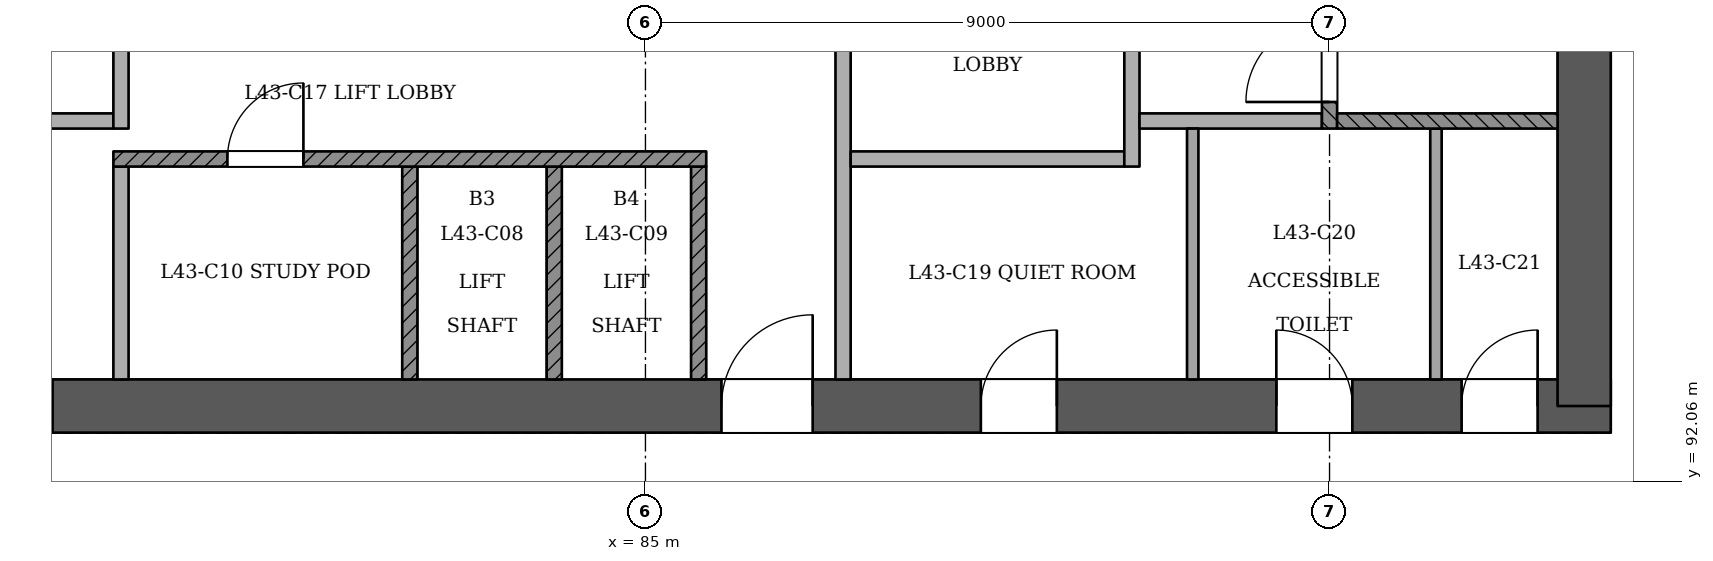
"""IFC4 building model, lengths in metres.
Left out: names, types, materials, properties, quantities, classifications, styles, units other than length and angle.
Written with IfcOpenShell. Run it as: python <this file> out.ifc"""

import sys

from ifc_helpers import new_model, si_unit, direction, frame, frame_2d, origin, place, context, subcontext, project, spatial, rectangle, extrude, element, fill, save


model = new_model("IFC4")
c1 = context("Model", 3, precision=1e-05, world=origin(), true_north=direction((0.0, 1.0)))
c2 = subcontext(c1, "Body", "Model", "MODEL_VIEW")
j1 = project(units=[si_unit("LENGTHUNIT", "METRE"), si_unit("PLANEANGLEUNIT", "RADIAN")], contexts=[c1])
p1 = place(None, origin())
s1 = spatial("IfcSite", under=j1, at=p1, CompositionType="ELEMENT")
p2 = place(p1, origin())
s2 = spatial("IfcBuilding", under=s1, at=p2, CompositionType="ELEMENT")
p3 = place(p2, frame((0.0, 0.0, 167.4)))
s3 = spatial("IfcBuildingStorey", under=s2, at=p3, CompositionType="ELEMENT", Elevation=167.4)
p4 = place(p3, frame((72.65, 93.05, 0.0), z_axis=(0.0, 0.0, 1.0), x_axis=(1.0, 0.0, 0.0)))
e1 = element("IfcWall", 1, at=p4, inside=s3, PredefinedType="SHEAR", context=c2, shape_type="SweptSolid", body=[
    extrude(rectangle(XDim=25.05, YDim=0.7, at=frame_2d((12.525, 0.0))), origin(), (0.0, 0.0, 1.0), 3.6),
])
p5 = place(p4, frame((1.15, 0.0, 0.0)))
e2 = element("IfcOpeningElement", 2, at=p5, cuts=e1, PredefinedType="OPENING", context=c2, shape_type="SweptSolid", body=[
    extrude(rectangle(XDim=1.2, YDim=2.1, at=frame_2d((0.6, 1.05))), frame((0.0, 0.36, 0.0), z_axis=(0.0, -1.0, 0.0), x_axis=(1.0, 0.0, 0.0)), (0.0, 0.0, 1.0), 0.721),
])
p6 = place(p4, frame((3.35, 0.0, 0.0)))
e3 = element("IfcOpeningElement", 3, at=p6, cuts=e1, PredefinedType="OPENING", context=c2, shape_type="SweptSolid", body=[
    extrude(rectangle(XDim=1.2, YDim=2.1, at=frame_2d((0.6, 1.05))), frame((0.0, 0.36, 0.0), z_axis=(0.0, -1.0, 0.0), x_axis=(1.0, 0.0, 0.0)), (0.0, 0.0, 1.0), 0.721),
])
p7 = place(p4, frame((13.35, 0.0, 0.0)))
e4 = element("IfcOpeningElement", 4, at=p7, cuts=e1, PredefinedType="OPENING", context=c2, shape_type="SweptSolid", body=[
    extrude(rectangle(XDim=1.2, YDim=2.1, at=frame_2d((0.6, 1.05))), frame((0.0, 0.36, 0.0), z_axis=(0.0, -1.0, 0.0), x_axis=(1.0, 0.0, 0.0)), (0.0, 0.0, 1.0), 0.721),
])
p8 = place(p4, frame((16.762, 0.0, 0.0)))
e5 = element("IfcOpeningElement", 5, at=p8, cuts=e1, PredefinedType="OPENING", context=c2, shape_type="SweptSolid", body=[
    extrude(rectangle(XDim=1.0, YDim=2.1, at=frame_2d((0.5, 1.05))), frame((0.0, 0.36, 0.0), z_axis=(0.0, -1.0, 0.0), x_axis=(1.0, 0.0, 0.0)), (0.0, 0.0, 1.0), 0.721),
])
p9 = place(p4, frame((20.65, 0.0, 0.0)))
e6 = element("IfcOpeningElement", 6, at=p9, cuts=e1, PredefinedType="OPENING", context=c2, shape_type="SweptSolid", body=[
    extrude(rectangle(XDim=1.0, YDim=2.1, at=frame_2d((0.5, 1.05))), frame((0.0, 0.36, 0.0), z_axis=(0.0, -1.0, 0.0), x_axis=(1.0, 0.0, 0.0)), (0.0, 0.0, 1.0), 0.721),
])
p10 = place(p4, frame((23.087, 0.0, 0.0)))
e7 = element("IfcOpeningElement", 7, at=p10, cuts=e1, PredefinedType="OPENING", context=c2, shape_type="SweptSolid", body=[
    extrude(rectangle(XDim=1.0, YDim=2.1, at=frame_2d((0.5, 1.05))), frame((0.0, 0.36, 0.0), z_axis=(0.0, -1.0, 0.0), x_axis=(1.0, 0.0, 0.0)), (0.0, 0.0, 1.0), 0.721),
])
p11 = place(p3, frame((97.35, 93.05, 0.0), z_axis=(0.0, 0.0, 1.0), x_axis=(0.0, 1.0, 0.0)))
e8 = element("IfcWall", 8, at=p11, inside=s3, PredefinedType="SHEAR", context=c2, shape_type="SweptSolid", body=[
    extrude(rectangle(XDim=11.05, YDim=0.7, at=frame_2d((5.525, 0.0))), origin(), (0.0, 0.0, 1.0), 3.6),
])
p12 = place(p3, frame((78.1, 93.4, 0.0), z_axis=(0.0, 0.0, 1.0), x_axis=(0.0, 1.0, 0.0)))
e9 = element("IfcWall", 9, at=p12, inside=s3, PredefinedType="PARTITIONING", context=c2, shape_type="SweptSolid", body=[
    extrude(rectangle(XDim=2.8, YDim=0.2, at=frame_2d((1.4, 0.0))), origin(), (0.0, 0.0, 1.0), 3.15),
])
for number, where, z_axis, x_axis in (
    (10, (81.9, 93.4, 0.0), (0.0, 0.0, 1.0), (0.0, 1.0, 0.0)),
    (11, (83.8, 93.4, 0.0), (0.0, 0.0, 1.0), (0.0, 1.0, 0.0)),
    (12, (85.7, 93.4, 0.0), (0.0, 0.0, 1.0), (0.0, 1.0, 0.0)),
):
    element("IfcWall", number, at=place(p3, frame(where, z_axis=z_axis, x_axis=x_axis)), inside=s3, PredefinedType="SOLIDWALL", context=c2, shape_type="SweptSolid", body=[
        extrude(rectangle(XDim=2.8, YDim=0.2, at=frame_2d((1.4, 0.0))), origin(), (0.0, 0.0, 1.0), 3.15),
    ])
p13 = place(p3, frame((87.6, 93.4, 0.0), z_axis=(0.0, 0.0, 1.0), x_axis=(0.0, 1.0, 0.0)))
e13 = element("IfcWall", 13, at=p13, inside=s3, PredefinedType="PARTITIONING", context=c2, shape_type="SweptSolid", body=[
    extrude(rectangle(XDim=7.0, YDim=0.2, at=frame_2d((3.5, 0.0))), origin(), (0.0, 0.0, 1.0), 3.15),
])
p14 = place(p13, frame((4.45, 0.0, 0.0)))
e14 = element("IfcOpeningElement", 14, at=p14, cuts=e13, PredefinedType="OPENING", context=c2, shape_type="SweptSolid", body=[
    extrude(rectangle(XDim=1.1, YDim=2.1, at=frame_2d((0.55, 1.05))), frame((0.0, 0.11, 0.0), z_axis=(0.0, -1.0, 0.0), x_axis=(1.0, 0.0, 0.0)), (0.0, 0.0, 1.0), 0.221),
])
for number, where, z_axis, x_axis in (
    (15, (92.2, 93.4, 0.0), (0.0, 0.0, 1.0), (0.0, 1.0, 0.0)),
    (16, (95.4, 93.4, 0.0), (0.0, 0.0, 1.0), (0.0, 1.0, 0.0)),
):
    element("IfcWall", number, at=place(p3, frame(where, z_axis=z_axis, x_axis=x_axis)), inside=s3, PredefinedType="PARTITIONING", context=c2, shape_type="SweptSolid", body=[
        extrude(rectangle(XDim=3.3, YDim=0.15, at=frame_2d((1.65, 0.0))), origin(), (0.0, 0.0, 1.0), 3.15),
    ])
p15 = place(p3, frame((78.0, 96.3, 0.0), z_axis=(0.0, 0.0, 1.0), x_axis=(1.0, 0.0, 0.0)))
e17 = element("IfcWall", 17, at=p15, inside=s3, PredefinedType="SOLIDWALL", context=c2, shape_type="SweptSolid", body=[
    extrude(rectangle(XDim=7.8, YDim=0.2, at=frame_2d((3.9, 0.0))), origin(), (0.0, 0.0, 1.0), 3.15),
])
p16 = place(p15, frame((1.5, 0.0, 0.0)))
e18 = element("IfcOpeningElement", 18, at=p16, cuts=e17, PredefinedType="OPENING", context=c2, shape_type="SweptSolid", body=[
    extrude(rectangle(XDim=1.0, YDim=2.1, at=frame_2d((0.5, 1.05))), frame((0.0, 0.11, 0.0), z_axis=(0.0, -1.0, 0.0), x_axis=(1.0, 0.0, 0.0)), (0.0, 0.0, 1.0), 0.221),
])
p17 = place(p3, frame((87.7, 96.3, 0.0), z_axis=(0.0, 0.0, 1.0), x_axis=(1.0, 0.0, 0.0)))
e19 = element("IfcWall", 19, at=p17, inside=s3, PredefinedType="PARTITIONING", context=c2, shape_type="SweptSolid", body=[
    extrude(rectangle(XDim=3.6, YDim=0.2, at=frame_2d((1.8, 0.0))), origin(), (0.0, 0.0, 1.0), 3.15),
])
p18 = place(p3, frame((91.4, 96.2, 0.0), z_axis=(0.0, 0.0, 1.0), x_axis=(0.0, 1.0, 0.0)))
e20 = element("IfcWall", 20, at=p18, inside=s3, PredefinedType="PARTITIONING", context=c2, shape_type="SweptSolid", body=[
    extrude(rectangle(XDim=4.2, YDim=0.2, at=frame_2d((2.1, 0.0))), origin(), (0.0, 0.0, 1.0), 3.15),
])
p19 = place(p18, frame((2.45, 0.0, 0.0)))
e21 = element("IfcOpeningElement", 21, at=p19, cuts=e20, PredefinedType="OPENING", context=c2, shape_type="SweptSolid", body=[
    extrude(rectangle(XDim=1.1, YDim=2.1, at=frame_2d((0.55, 1.05))), frame((0.0, 0.11, 0.0), z_axis=(0.0, -1.0, 0.0), x_axis=(1.0, 0.0, 0.0)), (0.0, 0.0, 1.0), 0.221),
])
p20 = place(p3, frame((76.1, 96.8, 0.0), z_axis=(0.0, 0.0, 1.0), x_axis=(1.0, 0.0, 0.0)))
e22 = element("IfcWall", 22, at=p20, inside=s3, PredefinedType="PARTITIONING", context=c2, shape_type="SweptSolid", body=[
    extrude(rectangle(XDim=1.9, YDim=0.2, at=frame_2d((0.95, 0.0))), origin(), (0.0, 0.0, 1.0), 3.15),
])
p21 = place(p3, frame((78.1, 96.7, 0.0), z_axis=(0.0, 0.0, 1.0), x_axis=(0.0, 1.0, 0.0)))
e23 = element("IfcWall", 23, at=p21, inside=s3, PredefinedType="PARTITIONING", context=c2, shape_type="SweptSolid", body=[
    extrude(rectangle(XDim=3.7, YDim=0.2, at=frame_2d((1.85, 0.0))), origin(), (0.0, 0.0, 1.0), 3.15),
])
p22 = place(p21, frame((1.95, 0.0, 0.0)))
e24 = element("IfcOpeningElement", 24, at=p22, cuts=e23, PredefinedType="OPENING", context=c2, shape_type="SweptSolid", body=[
    extrude(rectangle(XDim=1.1, YDim=2.1, at=frame_2d((0.55, 1.05))), frame((0.0, 0.11, 0.0), z_axis=(0.0, -1.0, 0.0), x_axis=(1.0, 0.0, 0.0)), (0.0, 0.0, 1.0), 0.221),
])
p23 = place(p3, frame((91.5, 96.8, 0.0), z_axis=(0.0, 0.0, 1.0), x_axis=(1.0, 0.0, 0.0)))
e25 = element("IfcWall", 25, at=p23, inside=s3, PredefinedType="PARTITIONING", context=c2, shape_type="SweptSolid", body=[
    extrude(rectangle(XDim=2.4, YDim=0.2, at=frame_2d((1.2, 0.0))), origin(), (0.0, 0.0, 1.0), 3.15),
])
p24 = place(p3, frame((94.0, 96.7, 0.0), z_axis=(0.0, 0.0, 1.0), x_axis=(0.0, 1.0, 0.0)))
e26 = element("IfcWall", 26, at=p24, inside=s3, PredefinedType="SOLIDWALL", context=c2, shape_type="SweptSolid", body=[
    extrude(rectangle(XDim=3.7, YDim=0.2, at=frame_2d((1.85, 0.0))), origin(), (0.0, 0.0, 1.0), 3.15),
])
p25 = place(p24, frame((0.35, 0.0, 0.0)))
e27 = element("IfcOpeningElement", 27, at=p25, cuts=e26, PredefinedType="OPENING", context=c2, shape_type="SweptSolid", body=[
    extrude(rectangle(XDim=1.1, YDim=2.1, at=frame_2d((0.55, 1.05))), frame((0.0, 0.11, 0.0), z_axis=(0.0, -1.0, 0.0), x_axis=(1.0, 0.0, 0.0)), (0.0, 0.0, 1.0), 0.221),
])
p26 = place(p3, frame((94.1, 96.8, 0.0), z_axis=(0.0, 0.0, 1.0), x_axis=(1.0, 0.0, 0.0)))
e28 = element("IfcWall", 28, at=p26, inside=s3, PredefinedType="SOLIDWALL", context=c2, shape_type="SweptSolid", body=[
    extrude(rectangle(XDim=2.9, YDim=0.2, at=frame_2d((1.45, 0.0))), origin(), (0.0, 0.0, 1.0), 3.15),
])
p27 = place(p25, origin())
e29 = element("IfcDoor", 29, at=p27, inside=s3, OperationType="SINGLE_SWING_LEFT", PredefinedType="NOTDEFINED", context=c2, shape_type="SweptSolid", body=[
    extrude(rectangle(XDim=1.1, YDim=2.1, at=frame_2d((0.55, 1.05))), frame((0.0, 0.025, 0.0), z_axis=(0.0, -1.0, 0.0), x_axis=(1.0, 0.0, 0.0)), (0.0, 0.0, 1.0), 0.05),
])
fill(e27, e29)
p28 = place(p6, origin())
e30 = element("IfcDoor", 30, at=p28, inside=s3, OperationType="SINGLE_SWING_LEFT", PredefinedType="NOTDEFINED", context=c2, shape_type="SweptSolid", body=[
    extrude(rectangle(XDim=1.2, YDim=2.1, at=frame_2d((0.6, 1.05))), frame((0.0, 0.025, 0.0), z_axis=(0.0, -1.0, 0.0), x_axis=(1.0, 0.0, 0.0)), (0.0, 0.0, 1.0), 0.05),
])
fill(e3, e30)
p29 = place(p7, origin())
e31 = element("IfcDoor", 31, at=p29, inside=s3, OperationType="SINGLE_SWING_RIGHT", PredefinedType="NOTDEFINED", context=c2, shape_type="SweptSolid", body=[
    extrude(rectangle(XDim=1.2, YDim=2.1, at=frame_2d((0.6, 1.05))), frame((0.0, 0.025, 0.0), z_axis=(0.0, -1.0, 0.0), x_axis=(1.0, 0.0, 0.0)), (0.0, 0.0, 1.0), 0.05),
])
fill(e4, e31)
p30 = place(p8, origin())
e32 = element("IfcDoor", 32, at=p30, inside=s3, OperationType="SINGLE_SWING_RIGHT", PredefinedType="NOTDEFINED", context=c2, shape_type="SweptSolid", body=[
    extrude(rectangle(XDim=1.0, YDim=2.1, at=frame_2d((0.5, 1.05))), frame((0.0, 0.025, 0.0), z_axis=(0.0, -1.0, 0.0), x_axis=(1.0, 0.0, 0.0)), (0.0, 0.0, 1.0), 0.05),
])
fill(e5, e32)
p31 = place(p9, origin())
e33 = element("IfcDoor", 33, at=p31, inside=s3, OperationType="SINGLE_SWING_LEFT", PredefinedType="NOTDEFINED", context=c2, shape_type="SweptSolid", body=[
    extrude(rectangle(XDim=1.0, YDim=2.1, at=frame_2d((0.5, 1.05))), frame((0.0, 0.025, 0.0), z_axis=(0.0, -1.0, 0.0), x_axis=(1.0, 0.0, 0.0)), (0.0, 0.0, 1.0), 0.05),
])
fill(e6, e33)
p32 = place(p10, origin())
e34 = element("IfcDoor", 34, at=p32, inside=s3, OperationType="SINGLE_SWING_RIGHT", PredefinedType="NOTDEFINED", context=c2, shape_type="SweptSolid", body=[
    extrude(rectangle(XDim=1.0, YDim=2.1, at=frame_2d((0.5, 1.05))), frame((0.0, 0.025, 0.0), z_axis=(0.0, -1.0, 0.0), x_axis=(1.0, 0.0, 0.0)), (0.0, 0.0, 1.0), 0.05),
])
fill(e7, e34)
p33 = place(p16, origin())
e35 = element("IfcDoor", 35, at=p33, inside=s3, OperationType="SINGLE_SWING_RIGHT", PredefinedType="NOTDEFINED", context=c2, shape_type="SweptSolid", body=[
    extrude(rectangle(XDim=1.0, YDim=2.1, at=frame_2d((0.5, 1.05))), frame((0.0, 0.025, 0.0), z_axis=(0.0, -1.0, 0.0), x_axis=(1.0, 0.0, 0.0)), (0.0, 0.0, 1.0), 0.05),
])
fill(e18, e35)
save(model, sys.argv[1])
